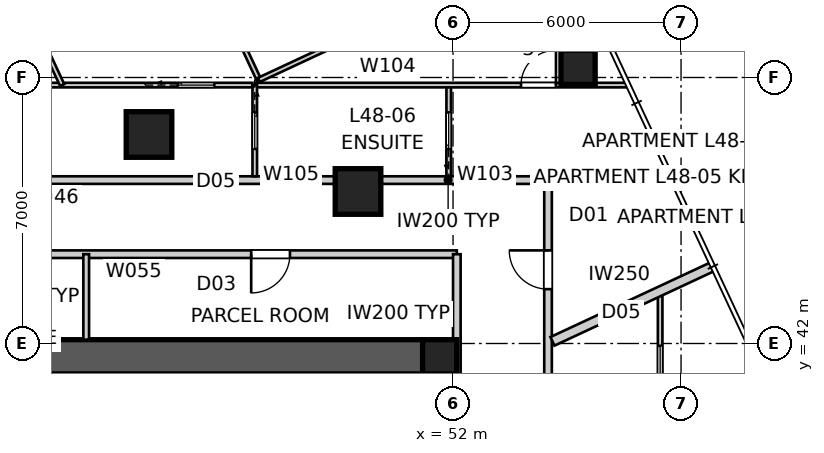
"""IFC4 building model, lengths in metres.
Left out: names, types, materials, properties, quantities, classifications, styles, units other than length and angle.
Written with IfcOpenShell. Run it as: python <this file> out.ifc"""

import sys

from ifc_helpers import new_model, si_unit, direction, frame, frame_2d, origin, origin_2d, place, context, subcontext, project, spatial, polyline, rectangle, outline, extrude, element, fill, save


model = new_model("IFC4")
c1 = context("Model", 3, precision=1e-05, world=origin(), true_north=direction((0.0, 1.0)))
c2 = subcontext(c1, "Body", "Model", "MODEL_VIEW")
j1 = project(units=[si_unit("LENGTHUNIT", "METRE"), si_unit("PLANEANGLEUNIT", "RADIAN")], contexts=[c1])
p1 = place(None, origin())
s1 = spatial("IfcSite", under=j1, at=p1, CompositionType="ELEMENT")
p2 = place(p1, origin())
s2 = spatial("IfcBuilding", under=s1, at=p2, CompositionType="ELEMENT")
p3 = place(p2, frame((0.0, 0.0, 176.0)))
s3 = spatial("IfcBuildingStorey", under=s2, at=p3, CompositionType="ELEMENT", Elevation=176.0)
p4 = place(p3, frame((28.8, 41.65, 0.0), z_axis=(0.0, 0.0, 1.0), x_axis=(1.0, 0.0, 0.0)))
e1 = element("IfcWall", 1, at=p4, inside=s3, PredefinedType="SHEAR", context=c2, shape_type="SweptSolid", body=[
    extrude(outline(polyline([(0.0, -0.45), (22.4, -0.45), (22.4, -0.025), (22.85, -0.025), (22.85, 0.025), (22.4, 0.025), (22.4, 0.45), (0.0, 0.45), (0.0, 0.025), (-0.45, 0.025), (-0.45, -0.025), (0.0, -0.025), (0.0, -0.45)])), origin(), (0.0, 0.0, 1.0), 3.4),
])
p5 = place(p3, frame((51.65, 18.8, 0.0), z_axis=(0.0, 0.0, 1.0), x_axis=(0.0, 1.0, 0.0)))
e2 = element("IfcWall", 2, at=p5, inside=s3, PredefinedType="SHEAR", context=c2, shape_type="SweptSolid", body=[
    extrude(outline(polyline([(0.0, -0.45), (22.4, -0.45), (22.4, -0.025), (22.85, -0.025), (22.85, 0.025), (22.4, 0.025), (22.4, 0.45), (0.0, 0.45), (0.0, 0.025), (-0.45, 0.025), (-0.45, -0.025), (0.0, -0.025), (0.0, -0.45)])), origin(), (0.0, 0.0, 1.0), 3.4),
])
p6 = place(p5, frame((11.14, 0.0, 0.0)))
e3 = element("IfcOpeningElement", 3, at=p6, cuts=e2, PredefinedType="OPENING", context=c2, shape_type="SweptSolid", body=[
    extrude(rectangle(XDim=1.02, YDim=2.4, at=frame_2d((0.51, 1.2))), frame((0.0, 0.46, 0.0), z_axis=(0.0, -1.0, 0.0), x_axis=(1.0, 0.0, 0.0)), (0.0, 0.0, 1.0), 0.92),
])
p7 = place(p3, frame((51.65, 41.65, 0.0), z_axis=(0.0, 0.0, 1.0), x_axis=(1.0, 0.0, 0.0)))
e4 = element("IfcColumn", 4, at=p7, inside=s3, PredefinedType="COLUMN", context=c2, shape_type="SweptSolid", body=[
    extrude(rectangle(XDim=0.9, YDim=0.9, at=origin_2d()), origin(), (0.0, 0.0, 1.0), 3.4),
])
p8 = place(p3, frame((55.29, 49.267, -0.15), z_axis=(0.0, 0.0, 1.0), x_axis=(1.0, 0.0, 0.0)))
e5 = element("IfcColumn", 5, at=p8, inside=s3, PredefinedType="COLUMN", context=c2, shape_type="SweptSolid", body=[
    extrude(rectangle(XDim=0.9, YDim=0.9, at=origin_2d()), origin(), (0.0, 0.0, 1.0), 3.55),
])
for number, where, z_axis, x_axis in (
    (6, (49.5, 46.0, 0.0), (0.0, 0.0, 1.0), (1.0, 0.0, 0.0)),
    (7, (44.0, 47.5, 0.0), (0.0, 0.0, 1.0), (1.0, 0.0, 0.0)),
):
    element("IfcColumn", number, at=place(p3, frame(where, z_axis=z_axis, x_axis=x_axis)), inside=s3, PredefinedType="COLUMN", context=c2, shape_type="SweptSolid", body=[
        extrude(rectangle(XDim=1.2, YDim=1.2, at=origin_2d()), origin(), (0.0, 0.0, 1.0), 3.4),
    ])
p9 = place(p3, frame((54.5, 13.7, 0.0), z_axis=(0.0, 0.0, 1.0), x_axis=(0.0, 1.0, 0.0)))
e8 = element("IfcWall", 8, at=p9, inside=s3, PredefinedType="PARTITIONING", context=c2, shape_type="SweptSolid", body=[
    extrude(rectangle(XDim=32.6, YDim=0.2, at=frame_2d((16.3, 0.0))), origin(), (0.0, 0.0, 1.0), 3.25),
])
p10 = place(p9, frame((3.326, 0.0, 0.0)))
e9 = element("IfcOpeningElement", 9, at=p10, cuts=e8, PredefinedType="OPENING", context=c2, shape_type="SweptSolid", body=[
    extrude(rectangle(XDim=1.02, YDim=2.34, at=frame_2d((0.51, 1.17))), frame((0.0, 0.11, 0.0), z_axis=(0.0, -1.0, 0.0), x_axis=(1.0, 0.0, 0.0)), (0.0, 0.0, 1.0), 0.22),
])
p11 = place(p9, frame((19.161, 0.0, 0.0)))
e10 = element("IfcOpeningElement", 10, at=p11, cuts=e8, PredefinedType="OPENING", context=c2, shape_type="SweptSolid", body=[
    extrude(rectangle(XDim=1.02, YDim=2.34, at=frame_2d((0.51, 1.17))), frame((0.0, 0.11, 0.0), z_axis=(0.0, -1.0, 0.0), x_axis=(1.0, 0.0, 0.0)), (0.0, 0.0, 1.0), 0.22),
])
p12 = place(p9, frame((29.73, 0.0, 0.0)))
e11 = element("IfcOpeningElement", 11, at=p12, cuts=e8, PredefinedType="OPENING", context=c2, shape_type="SweptSolid", body=[
    extrude(rectangle(XDim=1.02, YDim=2.34, at=frame_2d((0.51, 1.17))), frame((0.0, 0.11, 0.0), z_axis=(0.0, -1.0, 0.0), x_axis=(1.0, 0.0, 0.0)), (0.0, 0.0, 1.0), 0.22),
])
p13 = place(p9, frame((23.904, 0.0, 0.0)))
e12 = element("IfcOpeningElement", 12, at=p13, cuts=e8, PredefinedType="OPENING", context=c2, shape_type="SweptSolid", body=[
    extrude(rectangle(XDim=1.02, YDim=2.34, at=frame_2d((0.51, 1.17))), frame((0.0, 0.11, 0.0), z_axis=(0.0, -1.0, 0.0), x_axis=(1.0, 0.0, 0.0)), (0.0, 0.0, 1.0), 0.22),
])
p14 = place(p3, frame((54.5, 46.3, 0.0), z_axis=(0.0, 0.0, 1.0), x_axis=(-1.0, 0.0, 0.0)))
e13 = element("IfcWall", 13, at=p14, inside=s3, PredefinedType="PARTITIONING", context=c2, shape_type="SweptSolid", body=[
    extrude(rectangle(XDim=5.258, YDim=0.2, at=frame_2d((2.629, 0.0))), origin(), (0.0, 0.0, 1.0), 3.25),
])
p15 = place(p3, frame((49.242, 46.3, 0.0), z_axis=(0.0, 0.0, 1.0), x_axis=(-1.0, 0.0, 0.0)))
e14 = element("IfcWall", 14, at=p15, inside=s3, PredefinedType="PARTITIONING", context=c2, shape_type="SweptSolid", body=[
    extrude(rectangle(XDim=1.683, YDim=0.2, at=frame_2d((0.842, 0.0))), origin(), (0.0, 0.0, 1.0), 2.55),
])
p16 = place(p3, frame((47.558, 46.3, 0.0), z_axis=(0.0, 0.0, 1.0), x_axis=(-1.0, 0.0, 0.0)))
e15 = element("IfcWall", 15, at=p16, inside=s3, PredefinedType="PARTITIONING", context=c2, shape_type="SweptSolid", body=[
    extrude(rectangle(XDim=15.117, YDim=0.2, at=frame_2d((7.558, 0.0))), origin(), (0.0, 0.0, 1.0), 3.25),
])
p17 = place(p16, frame((12.295, 0.0, 0.0)))
e16 = element("IfcOpeningElement", 16, at=p17, cuts=e15, PredefinedType="OPENING", context=c2, shape_type="SweptSolid", body=[
    extrude(rectangle(XDim=1.02, YDim=2.34, at=frame_2d((0.51, 1.17))), frame((0.0, 0.11, 0.0), z_axis=(0.0, -1.0, 0.0), x_axis=(1.0, 0.0, 0.0)), (0.0, 0.0, 1.0), 0.22),
])
p18 = place(p3, frame((58.838, 44.025, 0.0), z_axis=(0.0, 0.0, 1.0), x_axis=(-0.906317010604, -0.422598481173, 0.0)))
e17 = element("IfcWall", 17, at=p18, inside=s3, PredefinedType="PARTITIONING", context=c2, shape_type="SweptSolid", body=[
    extrude(rectangle(XDim=4.657, YDim=0.25, at=frame_2d((2.329, 0.0))), origin(), (0.0, 0.0, 1.0), 3.25),
])
p19 = place(p3, frame((52.1, 44.35, 0.0), z_axis=(0.0, 0.0, 1.0), x_axis=(-1.0, 0.0, 0.0)))
e18 = element("IfcWall", 18, at=p19, inside=s3, PredefinedType="PARTITIONING", context=c2, shape_type="SweptSolid", body=[
    extrude(rectangle(XDim=24.2, YDim=0.2, at=frame_2d((12.1, 0.0))), origin(), (0.0, 0.0, 1.0), 3.25),
])
p20 = place(p19, frame((18.789, 0.0, 0.0)))
e19 = element("IfcOpeningElement", 19, at=p20, cuts=e18, PredefinedType="OPENING", context=c2, shape_type="SweptSolid", body=[
    extrude(rectangle(XDim=1.02, YDim=2.1, at=frame_2d((0.51, 1.05))), frame((0.0, 0.11, 0.0), z_axis=(0.0, -1.0, 0.0), x_axis=(1.0, 0.0, 0.0)), (0.0, 0.0, 1.0), 0.22),
])
p21 = place(p19, frame((4.391, 0.0, 0.0)))
e20 = element("IfcOpeningElement", 20, at=p21, cuts=e18, PredefinedType="OPENING", context=c2, shape_type="SweptSolid", body=[
    extrude(rectangle(XDim=1.02, YDim=2.1, at=frame_2d((0.51, 1.05))), frame((0.0, 0.11, 0.0), z_axis=(0.0, -1.0, 0.0), x_axis=(1.0, 0.0, 0.0)), (0.0, 0.0, 1.0), 0.22),
])
p22 = place(p19, frame((11.59, 0.0, 0.0)))
e21 = element("IfcOpeningElement", 21, at=p22, cuts=e18, PredefinedType="OPENING", context=c2, shape_type="SweptSolid", body=[
    extrude(rectangle(XDim=1.02, YDim=2.1, at=frame_2d((0.51, 1.05))), frame((0.0, 0.11, 0.0), z_axis=(0.0, -1.0, 0.0), x_axis=(1.0, 0.0, 0.0)), (0.0, 0.0, 1.0), 0.22),
])
p23 = place(p3, frame((52.1, 41.18, 0.0), z_axis=(0.0, 0.0, 1.0), x_axis=(0.0, 1.0, 0.0)))
e22 = element("IfcWall", 22, at=p23, inside=s3, PredefinedType="PARTITIONING", context=c2, shape_type="SweptSolid", body=[
    extrude(rectangle(XDim=3.17, YDim=0.2, at=frame_2d((1.585, 0.0))), origin(), (0.0, 0.0, 1.0), 3.25),
])
p24 = place(p3, frame((42.347, 42.1, 0.0), z_axis=(0.0, 0.0, 1.0), x_axis=(0.0, 1.0, 0.0)))
e23 = element("IfcWall", 23, at=p24, inside=s3, PredefinedType="SOLIDWALL", context=c2, shape_type="SweptSolid", body=[
    extrude(rectangle(XDim=2.25, YDim=0.15, at=frame_2d((1.125, 0.0))), origin(), (0.0, 0.0, 1.0), 3.25),
])
p25 = place(p3, frame((57.45, 39.538, 0.0), z_axis=(0.0, 0.0, 1.0), x_axis=(0.0, 1.0, 0.0)))
e24 = element("IfcWall", 24, at=p25, inside=s3, PredefinedType="PARTITIONING", context=c2, shape_type="SweptSolid", body=[
    extrude(rectangle(XDim=3.84, YDim=0.12, at=frame_2d((1.92, 0.0))), origin(), (0.0, 0.0, 1.0), 3.25),
])
p26 = place(p25, frame((1.44, 0.0, 0.0)))
e25 = element("IfcOpeningElement", 25, at=p26, cuts=e24, PredefinedType="OPENING", context=c2, shape_type="SweptSolid", body=[
    extrude(rectangle(XDim=0.96, YDim=2.1, at=frame_2d((0.48, 1.05))), frame((0.0, 0.07, 0.0), z_axis=(0.0, -1.0, 0.0), x_axis=(1.0, 0.0, 0.0)), (0.0, 0.0, 1.0), 0.14),
])
p27 = place(p3, frame((51.886, 46.4, 0.0), z_axis=(0.0, 0.0, 1.0), x_axis=(0.0, 1.0, 0.0)))
e26 = element("IfcWall", 26, at=p27, inside=s3, PredefinedType="PARTITIONING", context=c2, shape_type="SweptSolid", body=[
    extrude(rectangle(XDim=2.4, YDim=0.12, at=frame_2d((1.2, 0.0))), origin(), (0.0, 0.0, 1.0), 3.25),
])
p28 = place(p27, frame((0.72, 0.0, 0.0)))
e27 = element("IfcOpeningElement", 27, at=p28, cuts=e26, PredefinedType="OPENING", context=c2, shape_type="SweptSolid", body=[
    extrude(rectangle(XDim=0.96, YDim=2.1, at=frame_2d((0.48, 1.05))), frame((0.0, 0.07, 0.0), z_axis=(0.0, -1.0, 0.0), x_axis=(1.0, 0.0, 0.0)), (0.0, 0.0, 1.0), 0.14),
])
p29 = place(p3, frame((46.783, 48.8, 0.0), z_axis=(0.0, 0.0, 1.0), x_axis=(1.0, 0.0, 0.0)))
e28 = element("IfcWall", 28, at=p29, inside=s3, PredefinedType="PARTITIONING", context=c2, shape_type="SweptSolid", body=[
    extrude(rectangle(XDim=9.784, YDim=0.12, at=frame_2d((4.892, 0.0))), origin(), (0.0, 0.0, 1.0), 3.25),
])
p30 = place(p29, frame((7.006, 0.0, 0.0)))
e29 = element("IfcOpeningElement", 29, at=p30, cuts=e28, PredefinedType="OPENING", context=c2, shape_type="SweptSolid", body=[
    extrude(rectangle(XDim=0.92, YDim=2.34, at=frame_2d((0.46, 1.17))), frame((0.0, 0.07, 0.0), z_axis=(0.0, -1.0, 0.0), x_axis=(1.0, 0.0, 0.0)), (0.0, 0.0, 1.0), 0.14),
])
p31 = place(p3, frame((46.783, 48.8, 0.0), z_axis=(0.0, 0.0, 1.0), x_axis=(0.0, -1.0, 0.0)))
e30 = element("IfcWall", 30, at=p31, inside=s3, PredefinedType="PARTITIONING", context=c2, shape_type="SweptSolid", body=[
    extrude(rectangle(XDim=2.4, YDim=0.12, at=frame_2d((1.2, 0.0))), origin(), (0.0, 0.0, 1.0), 3.25),
])
p32 = place(p31, frame((0.72, 0.0, 0.0)))
e31 = element("IfcOpeningElement", 31, at=p32, cuts=e30, PredefinedType="OPENING", context=c2, shape_type="SweptSolid", body=[
    extrude(rectangle(XDim=0.96, YDim=2.1, at=frame_2d((0.48, 1.05))), frame((0.0, 0.07, 0.0), z_axis=(0.0, -1.0, 0.0), x_axis=(1.0, 0.0, 0.0)), (0.0, 0.0, 1.0), 0.14),
])
p33 = place(p3, frame((25.993, 48.8, 0.0), z_axis=(0.0, 0.0, 1.0), x_axis=(1.0, 0.0, 0.0)))
e32 = element("IfcWall", 32, at=p33, inside=s3, PredefinedType="PARTITIONING", context=c2, shape_type="SweptSolid", body=[
    extrude(rectangle(XDim=20.724, YDim=0.12, at=frame_2d((10.362, 0.0))), origin(), (0.0, 0.0, 1.0), 3.25),
])
p34 = place(p33, frame((7.681, 0.0, 0.0)))
e33 = element("IfcOpeningElement", 33, at=p34, cuts=e32, PredefinedType="OPENING", context=c2, shape_type="SweptSolid", body=[
    extrude(rectangle(XDim=0.92, YDim=2.34, at=frame_2d((0.46, 1.17))), frame((0.0, 0.07, 0.0), z_axis=(0.0, -1.0, 0.0), x_axis=(1.0, 0.0, 0.0)), (0.0, 0.0, 1.0), 0.14),
])
p35 = place(p33, frame((18.766, 0.0, 0.0)))
e34 = element("IfcOpeningElement", 34, at=p35, cuts=e32, PredefinedType="OPENING", context=c2, shape_type="SweptSolid", body=[
    extrude(rectangle(XDim=0.96, YDim=2.1, at=frame_2d((0.48, 1.05))), frame((0.0, 0.07, 0.0), z_axis=(0.0, -1.0, 0.0), x_axis=(1.0, 0.0, 0.0)), (0.0, 0.0, 1.0), 0.14),
])
p36 = place(p33, frame((12.333, 0.0, 0.0)))
e35 = element("IfcOpeningElement", 35, at=p36, cuts=e32, PredefinedType="OPENING", context=c2, shape_type="SweptSolid", body=[
    extrude(rectangle(XDim=0.96, YDim=2.1, at=frame_2d((0.48, 1.05))), frame((0.0, 0.07, 0.0), z_axis=(0.0, -1.0, 0.0), x_axis=(1.0, 0.0, 0.0)), (0.0, 0.0, 1.0), 0.14),
])
p37 = place(p3, frame((46.893, 48.937, 0.0), z_axis=(0.0, 0.0, 1.0), x_axis=(-0.422638395676, 0.906298398156, 0.0)))
e36 = element("IfcWall", 36, at=p37, inside=s3, PredefinedType="PARTITIONING", context=c2, shape_type="SweptSolid", body=[
    extrude(rectangle(XDim=8.71, YDim=0.12, at=frame_2d((4.355, 0.0))), origin(), (0.0, 0.0, 1.0), 3.25),
])
p38 = place(p3, frame((54.787, 52.618, 0.0), z_axis=(0.0, 0.0, 1.0), x_axis=(-0.906314140712, -0.422604635972, 0.0)))
e37 = element("IfcWall", 37, at=p38, inside=s3, PredefinedType="PARTITIONING", context=c2, shape_type="SweptSolid", body=[
    extrude(rectangle(XDim=8.71, YDim=0.12, at=frame_2d((4.355, 0.0))), origin(), (0.0, 0.0, 1.0), 3.25),
])
p39 = place(p38, frame((3.875, 0.0, 0.0)))
e38 = element("IfcOpeningElement", 38, at=p39, cuts=e37, PredefinedType="OPENING", context=c2, shape_type="SweptSolid", body=[
    extrude(rectangle(XDim=0.92, YDim=2.34, at=frame_2d((0.46, 1.17))), frame((0.0, 0.07, 0.0), z_axis=(0.0, -1.0, 0.0), x_axis=(1.0, 0.0, 0.0)), (0.0, 0.0, 1.0), 0.14),
])
p40 = place(p3, frame((41.716, 48.8, 0.0), z_axis=(0.0, 0.0, 1.0), x_axis=(-0.422642131948, 0.906296655793, 0.0)))
e39 = element("IfcWall", 39, at=p40, inside=s3, PredefinedType="PARTITIONING", context=c2, shape_type="SweptSolid", body=[
    extrude(rectangle(XDim=6.646, YDim=0.12, at=frame_2d((3.323, 0.0))), origin(), (0.0, 0.0, 1.0), 3.25),
])
p41 = place(p21, origin())
e40 = element("IfcDoor", 40, at=p41, inside=s3, OperationType="SINGLE_SWING_RIGHT", PredefinedType="DOOR", context=c2, shape_type="SweptSolid", body=[
    extrude(rectangle(XDim=1.02, YDim=2.1, at=frame_2d((0.51, 1.05))), frame((0.0, 0.025, 0.0), z_axis=(0.0, -1.0, 0.0), x_axis=(1.0, 0.0, 0.0)), (0.0, 0.0, 1.0), 0.05),
])
fill(e20, e40)
p42 = place(p12, origin())
e41 = element("IfcDoor", 41, at=p42, inside=s3, OperationType="SINGLE_SWING_RIGHT", PredefinedType="DOOR", context=c2, shape_type="SweptSolid", body=[
    extrude(rectangle(XDim=1.02, YDim=2.34, at=frame_2d((0.51, 1.17))), frame((0.0, 0.025, 0.0), z_axis=(0.0, -1.0, 0.0), x_axis=(1.0, 0.0, 0.0)), (0.0, 0.0, 1.0), 0.05),
])
fill(e11, e41)
p43 = place(p30, origin())
e42 = element("IfcDoor", 42, at=p43, inside=s3, OperationType="SINGLE_SWING_RIGHT", PredefinedType="DOOR", context=c2, shape_type="SweptSolid", body=[
    extrude(rectangle(XDim=0.92, YDim=2.34, at=frame_2d((0.46, 1.17))), frame((0.0, 0.025, 0.0), z_axis=(0.0, -1.0, 0.0), x_axis=(1.0, 0.0, 0.0)), (0.0, 0.0, 1.0), 0.05),
])
fill(e29, e42)
p44 = place(p28, origin())
e43 = element("IfcDoor", 43, at=p44, inside=s3, OperationType="SLIDING_TO_LEFT", PredefinedType="DOOR", context=c2, shape_type="SweptSolid", body=[
    extrude(rectangle(XDim=0.96, YDim=2.1, at=frame_2d((0.48, 1.05))), frame((0.0, 0.025, 0.0), z_axis=(0.0, -1.0, 0.0), x_axis=(1.0, 0.0, 0.0)), (0.0, 0.0, 1.0), 0.05),
])
fill(e27, e43)
p45 = place(p26, origin())
e44 = element("IfcDoor", 44, at=p45, inside=s3, OperationType="SLIDING_TO_LEFT", PredefinedType="DOOR", context=c2, shape_type="SweptSolid", body=[
    extrude(rectangle(XDim=0.96, YDim=2.1, at=frame_2d((0.48, 1.05))), frame((0.0, 0.025, 0.0), z_axis=(0.0, -1.0, 0.0), x_axis=(1.0, 0.0, 0.0)), (0.0, 0.0, 1.0), 0.05),
])
fill(e25, e44)
p46 = place(p32, origin())
e45 = element("IfcDoor", 45, at=p46, inside=s3, OperationType="SLIDING_TO_LEFT", PredefinedType="DOOR", context=c2, shape_type="SweptSolid", body=[
    extrude(rectangle(XDim=0.96, YDim=2.1, at=frame_2d((0.48, 1.05))), frame((0.0, 0.025, 0.0), z_axis=(0.0, -1.0, 0.0), x_axis=(1.0, 0.0, 0.0)), (0.0, 0.0, 1.0), 0.05),
])
fill(e31, e45)
p47 = place(p35, origin())
e46 = element("IfcDoor", 46, at=p47, inside=s3, OperationType="SLIDING_TO_LEFT", PredefinedType="DOOR", context=c2, shape_type="SweptSolid", body=[
    extrude(rectangle(XDim=0.96, YDim=2.1, at=frame_2d((0.48, 1.05))), frame((0.0, 0.025, 0.0), z_axis=(0.0, -1.0, 0.0), x_axis=(1.0, 0.0, 0.0)), (0.0, 0.0, 1.0), 0.05),
])
fill(e34, e46)
save(model, sys.argv[1])
